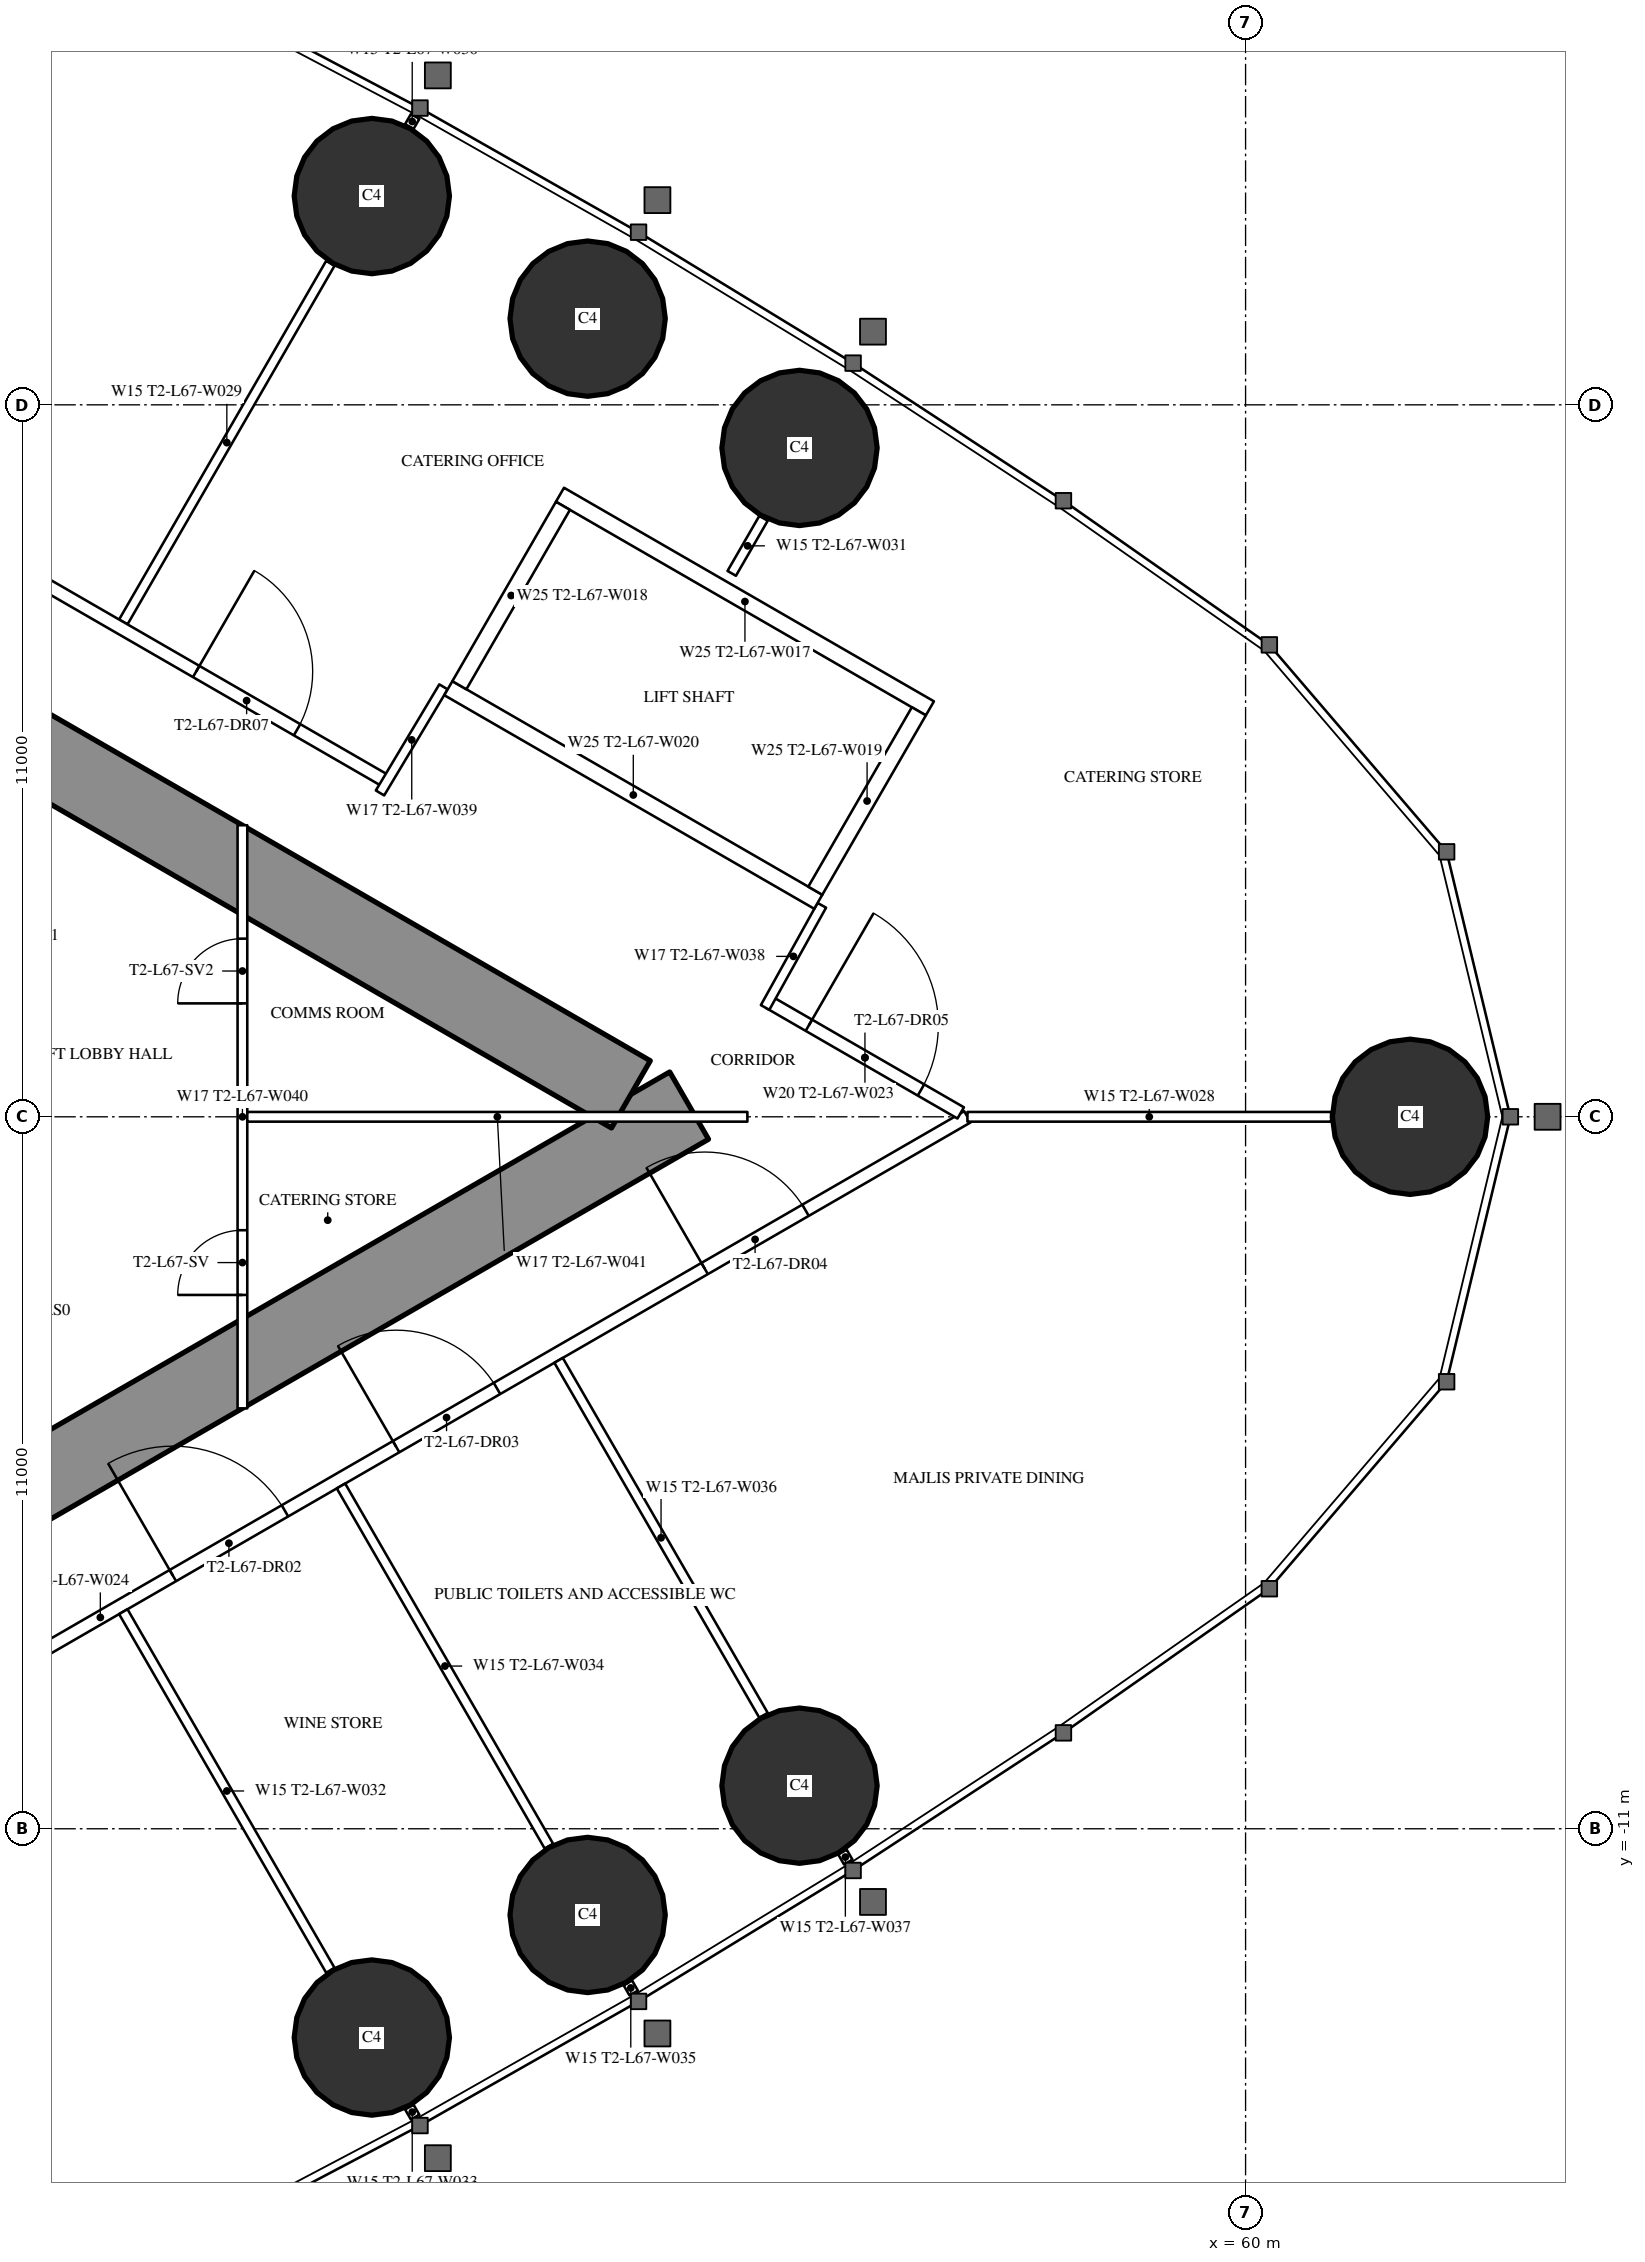
"""IFC4 building model, lengths in metres.
Left out: names, types, materials, properties, quantities, classifications, styles, units other than length and angle.
Written with IfcOpenShell. Run it as: python <this file> out.ifc"""

import sys

from ifc_helpers import new_model, si_unit, direction, frame, frame_2d, origin, origin_2d, place, context, subcontext, project, spatial, rectangle, circle, extrude, element, fill, save


model = new_model("IFC4")
c1 = context("Model", 3, precision=1e-05, world=origin(), true_north=direction((0.0, 1.0)))
c2 = subcontext(c1, "Body", "Model", "MODEL_VIEW")
j1 = project(units=[si_unit("LENGTHUNIT", "METRE"), si_unit("PLANEANGLEUNIT", "RADIAN")], contexts=[c1])
p1 = place(None, origin())
s1 = spatial("IfcSite", under=j1, at=p1, CompositionType="ELEMENT")
p2 = place(p1, origin())
s2 = spatial("IfcBuilding", under=s1, at=p2, CompositionType="ELEMENT")
p3 = place(p2, frame((0.0, 0.0, 251.9)))
s3 = spatial("IfcBuildingStorey", under=s2, at=p3, CompositionType="ELEMENT", Elevation=251.9)
for number, where, z_axis, x_axis in (
    (1, (62.542, 0.0, 0.0), (0.0, 0.0, 1.0), (1.0, 0.0, 0.0)),
    (2, (53.108, 10.334, 0.0), (0.0, 0.0, 1.0), (1.0, 0.0, 0.0)),
    (3, (49.834, 12.332, 0.0), (0.0, 0.0, 1.0), (1.0, 0.0, 0.0)),
    (4, (46.499, 14.226, 0.0), (0.0, 0.0, 1.0), (1.0, 0.0, 0.0)),
    (5, (46.499, -14.226, 0.0), (0.0, 0.0, 1.0), (1.0, 0.0, 0.0)),
    (6, (49.834, -12.332, 0.0), (0.0, 0.0, 1.0), (1.0, 0.0, 0.0)),
    (7, (53.108, -10.334, 0.0), (0.0, 0.0, 1.0), (1.0, 0.0, 0.0)),
):
    element("IfcColumn", number, at=place(p3, frame(where, z_axis=z_axis, x_axis=x_axis)), inside=s3, PredefinedType="COLUMN", context=c2, shape_type="SweptSolid", body=[
        extrude(circle(Radius=1.2, at=origin_2d()), origin(), (0.0, 0.0, 1.0), 5.4),
    ])
p4 = place(p3, frame((27.2, -13.8, 0.0), z_axis=(0.0, 0.0, 1.0), x_axis=(0.866027159892, 0.499996958321, 0.0)))
e8 = element("IfcWall", 8, at=p4, inside=s3, PredefinedType="SHEAR", context=c2, shape_type="SweptSolid", body=[
    extrude(rectangle(XDim=27.947, YDim=1.2, at=frame_2d((13.973, 0.0))), origin(), (0.0, 0.0, 1.0), 5.4),
])
p5 = place(p4, frame((4.6, 0.0, 0.0)))
e9 = element("IfcOpeningElement", 9, at=p5, cuts=e8, PredefinedType="OPENING", context=c2, shape_type="SweptSolid", body=[
    extrude(rectangle(XDim=1.0, YDim=2.2, at=frame_2d((0.5, 1.1))), frame((0.0, 0.61, 0.0), z_axis=(0.0, -1.0, 0.0), x_axis=(1.0, 0.0, 0.0)), (0.0, 0.0, 1.0), 1.22),
])
p6 = place(p4, frame((13.395, 0.0, 0.0)))
e10 = element("IfcOpeningElement", 10, at=p6, cuts=e8, PredefinedType="OPENING", context=c2, shape_type="SweptSolid", body=[
    extrude(rectangle(XDim=1.8, YDim=2.2, at=frame_2d((0.9, 1.1))), frame((0.0, 0.61, 0.0), z_axis=(0.0, -1.0, 0.0), x_axis=(1.0, 0.0, 0.0)), (0.0, 0.0, 1.0), 1.22),
])
p7 = place(p3, frame((27.2, 13.8, 0.0), z_axis=(0.0, 0.0, 1.0), x_axis=(0.866024515034, -0.500001539357, 0.0)))
e11 = element("IfcWall", 11, at=p7, inside=s3, PredefinedType="SHEAR", context=c2, shape_type="SweptSolid", body=[
    extrude(rectangle(XDim=26.907, YDim=1.2, at=frame_2d((13.454, 0.0))), origin(), (0.0, 0.0, 1.0), 5.4),
])
p8 = place(p7, frame((4.6, 0.0, 0.0)))
e12 = element("IfcOpeningElement", 12, at=p8, cuts=e11, PredefinedType="OPENING", context=c2, shape_type="SweptSolid", body=[
    extrude(rectangle(XDim=1.0, YDim=2.2, at=frame_2d((0.5, 1.1))), frame((0.0, 0.61, 0.0), z_axis=(0.0, -1.0, 0.0), x_axis=(1.0, 0.0, 0.0)), (0.0, 0.0, 1.0), 1.22),
])
p9 = place(p7, frame((13.395, 0.0, 0.0)))
e13 = element("IfcOpeningElement", 13, at=p9, cuts=e11, PredefinedType="OPENING", context=c2, shape_type="SweptSolid", body=[
    extrude(rectangle(XDim=1.8, YDim=2.2, at=frame_2d((0.9, 1.1))), frame((0.0, 0.61, 0.0), z_axis=(0.0, -1.0, 0.0), x_axis=(1.0, 0.0, 0.0)), (0.0, 0.0, 1.0), 1.22),
])
p10 = place(p3, frame((28.907, -15.47, 0.0), z_axis=(0.0, 0.0, 1.0), x_axis=(0.866023700353, 0.500002950419, 0.0)))
e14 = element("IfcWall", 14, at=p10, inside=s3, PredefinedType="PARTITIONING", context=c2, shape_type="SweptSolid", body=[
    extrude(rectangle(XDim=30.941, YDim=0.2, at=frame_2d((15.47, 0.0))), origin(), (0.0, 0.0, 1.0), 5.15),
])
p11 = place(p10, frame((7.124, 0.0, 0.0)))
e15 = element("IfcOpeningElement", 15, at=p11, cuts=e14, PredefinedType="OPENING", context=c2, shape_type="SweptSolid", body=[
    extrude(rectangle(XDim=1.8, YDim=2.2, at=frame_2d((0.9, 1.1))), frame((0.0, 0.11, 0.0), z_axis=(0.0, -1.0, 0.0), x_axis=(1.0, 0.0, 0.0)), (0.0, 0.0, 1.0), 0.22),
])
p12 = place(p10, frame((16.765, 0.0, 0.0)))
e16 = element("IfcOpeningElement", 16, at=p12, cuts=e14, PredefinedType="OPENING", context=c2, shape_type="SweptSolid", body=[
    extrude(rectangle(XDim=2.0, YDim=2.4, at=frame_2d((1.0, 1.2))), frame((0.0, 0.11, 0.0), z_axis=(0.0, -1.0, 0.0), x_axis=(1.0, 0.0, 0.0)), (0.0, 0.0, 1.0), 0.22),
])
p13 = place(p10, frame((20.748, 0.0, 0.0)))
e17 = element("IfcOpeningElement", 17, at=p13, cuts=e14, PredefinedType="OPENING", context=c2, shape_type="SweptSolid", body=[
    extrude(rectangle(XDim=1.8, YDim=2.2, at=frame_2d((0.9, 1.1))), frame((0.0, 0.11, 0.0), z_axis=(0.0, -1.0, 0.0), x_axis=(1.0, 0.0, 0.0)), (0.0, 0.0, 1.0), 0.22),
])
p14 = place(p10, frame((26.252, 0.0, 0.0)))
e18 = element("IfcOpeningElement", 18, at=p14, cuts=e14, PredefinedType="OPENING", context=c2, shape_type="SweptSolid", body=[
    extrude(rectangle(XDim=1.8, YDim=2.2, at=frame_2d((0.9, 1.1))), frame((0.0, 0.11, 0.0), z_axis=(0.0, -1.0, 0.0), x_axis=(1.0, 0.0, 0.0)), (0.0, 0.0, 1.0), 0.22),
])
p15 = place(p3, frame((42.66, -7.646, 0.0), z_axis=(0.0, 0.0, 1.0), x_axis=(0.499996592859, -0.866027370889, 0.0)))
e19 = element("IfcWall", 19, at=p15, inside=s3, PredefinedType="PARTITIONING", context=c2, shape_type="SweptSolid", body=[
    extrude(rectangle(XDim=6.398, YDim=0.15, at=frame_2d((3.199, 0.0))), origin(), (0.0, 0.0, 1.0), 4.25),
])
p16 = place(p3, frame((47.079, -15.3, 0.0), z_axis=(0.0, 0.0, 1.0), x_axis=(0.499212083968, -0.866479829667, 0.0)))
e20 = element("IfcWall", 20, at=p16, inside=s3, PredefinedType="PARTITIONING", context=c2, shape_type="SweptSolid", body=[
    extrude(rectangle(XDim=0.179, YDim=0.15, at=frame_2d((0.09, 0.0))), origin(), (0.0, 0.0, 1.0), 4.25),
])
p17 = place(p3, frame((46.023, -5.704, 0.0), z_axis=(0.0, 0.0, 1.0), x_axis=(0.499984478165, -0.866034365135, 0.0)))
e21 = element("IfcWall", 21, at=p17, inside=s3, PredefinedType="PARTITIONING", context=c2, shape_type="SweptSolid", body=[
    extrude(rectangle(XDim=6.426, YDim=0.15, at=frame_2d((3.213, 0.0))), origin(), (0.0, 0.0, 1.0), 4.25),
])
p18 = place(p3, frame((50.456, -13.382, 0.0), z_axis=(0.0, 0.0, 1.0), x_axis=(0.500661834965, -0.865642955848, 0.0)))
e22 = element("IfcWall", 22, at=p18, inside=s3, PredefinedType="PARTITIONING", context=c2, shape_type="SweptSolid", body=[
    extrude(rectangle(XDim=0.18, YDim=0.15, at=frame_2d((0.09, 0.0))), origin(), (0.0, 0.0, 1.0), 4.25),
])
p19 = place(p3, frame((49.385, -3.763, 0.0), z_axis=(0.0, 0.0, 1.0), x_axis=(0.499999447814, -0.866025722589, 0.0)))
e23 = element("IfcWall", 23, at=p19, inside=s3, PredefinedType="PARTITIONING", context=c2, shape_type="SweptSolid", body=[
    extrude(rectangle(XDim=6.333, YDim=0.15, at=frame_2d((3.166, 0.0))), origin(), (0.0, 0.0, 1.0), 4.25),
])
p20 = place(p3, frame((53.771, -11.36, 0.0), z_axis=(0.0, 0.0, 1.0), x_axis=(0.499524978789, -0.866299483762, 0.0)))
e24 = element("IfcWall", 24, at=p20, inside=s3, PredefinedType="PARTITIONING", context=c2, shape_type="SweptSolid", body=[
    extrude(rectangle(XDim=0.178, YDim=0.15, at=frame_2d((0.089, 0.0))), origin(), (0.0, 0.0, 1.0), 4.25),
])
p21 = place(p3, frame((42.66, 7.646, 0.0), z_axis=(0.0, 0.0, 1.0), x_axis=(0.499996592859, 0.866027370889, 0.0)))
e25 = element("IfcWall", 25, at=p21, inside=s3, PredefinedType="PARTITIONING", context=c2, shape_type="SweptSolid", body=[
    extrude(rectangle(XDim=6.398, YDim=0.15, at=frame_2d((3.199, 0.0))), origin(), (0.0, 0.0, 1.0), 4.25),
])
p22 = place(p3, frame((47.079, 15.3, 0.0), z_axis=(0.0, 0.0, 1.0), x_axis=(0.499212083968, 0.866479829667, 0.0)))
e26 = element("IfcWall", 26, at=p22, inside=s3, PredefinedType="PARTITIONING", context=c2, shape_type="SweptSolid", body=[
    extrude(rectangle(XDim=0.179, YDim=0.15, at=frame_2d((0.09, 0.0))), origin(), (0.0, 0.0, 1.0), 4.25),
])
p23 = place(p3, frame((55.702, 0.0, 0.0), z_axis=(0.0, 0.0, 1.0), x_axis=(1.0, 0.0, 0.0)))
e27 = element("IfcWall", 27, at=p23, inside=s3, PredefinedType="PARTITIONING", context=c2, shape_type="SweptSolid", body=[
    extrude(rectangle(XDim=5.619, YDim=0.15, at=frame_2d((2.81, 0.0))), origin(), (0.0, 0.0, 1.0), 4.25),
])
p24 = place(p3, frame((52.06, 8.396, 0.0), z_axis=(0.0, 0.0, 1.0), x_axis=(0.500095379624, 0.865970329329, 0.0)))
e28 = element("IfcWall", 28, at=p24, inside=s3, PredefinedType="PARTITIONING", context=c2, shape_type="SweptSolid", body=[
    extrude(rectangle(XDim=0.982, YDim=0.15, at=frame_2d((0.491, 0.0))), origin(), (0.0, 0.0, 1.0), 5.15),
])
p25 = place(p3, frame((28.907, 15.47, 0.0), z_axis=(0.0, 0.0, 1.0), x_axis=(0.866026627509, -0.499997880441, 0.0)))
e29 = element("IfcWall", 29, at=p25, inside=s3, PredefinedType="PARTITIONING", context=c2, shape_type="SweptSolid", body=[
    extrude(rectangle(XDim=20.563, YDim=0.2, at=frame_2d((10.282, 0.0))), origin(), (0.0, 0.0, 1.0), 5.15),
])
p26 = place(p25, frame((17.181, 0.0, 0.0)))
e30 = element("IfcOpeningElement", 30, at=p26, cuts=e29, PredefinedType="OPENING", context=c2, shape_type="SweptSolid", body=[
    extrude(rectangle(XDim=1.8, YDim=2.2, at=frame_2d((0.9, 1.1))), frame((0.0, 0.11, 0.0), z_axis=(0.0, -1.0, 0.0), x_axis=(1.0, 0.0, 0.0)), (0.0, 0.0, 1.0), 0.22),
])
p27 = place(p25, frame((7.024, 0.0, 0.0)))
e31 = element("IfcOpeningElement", 31, at=p27, cuts=e29, PredefinedType="OPENING", context=c2, shape_type="SweptSolid", body=[
    extrude(rectangle(XDim=2.0, YDim=2.4, at=frame_2d((1.0, 1.2))), frame((0.0, 0.11, 0.0), z_axis=(0.0, -1.0, 0.0), x_axis=(1.0, 0.0, 0.0)), (0.0, 0.0, 1.0), 0.22),
])
p28 = place(p3, frame((52.639, 1.769, 0.0), z_axis=(0.0, 0.0, 1.0), x_axis=(0.866027340901, -0.4999966448, 0.0)))
e32 = element("IfcWall", 32, at=p28, inside=s3, PredefinedType="PARTITIONING", context=c2, shape_type="SweptSolid", body=[
    extrude(rectangle(XDim=3.417, YDim=0.2, at=frame_2d((1.708, 0.0))), origin(), (0.0, 0.0, 1.0), 5.15),
])
p29 = place(p28, frame((0.708, 0.0, 0.0)))
e33 = element("IfcOpeningElement", 33, at=p29, cuts=e32, PredefinedType="OPENING", context=c2, shape_type="SweptSolid", body=[
    extrude(rectangle(XDim=2.0, YDim=2.4, at=frame_2d((1.0, 1.2))), frame((0.0, 0.11, 0.0), z_axis=(0.0, -1.0, 0.0), x_axis=(1.0, 0.0, 0.0)), (0.0, 0.0, 1.0), 0.22),
])
p30 = place(p3, frame((47.606, 6.642, 0.0), z_axis=(0.0, 0.0, 1.0), x_axis=(-0.51353662755, -0.858067673418, 0.0)))
e34 = element("IfcWall", 34, at=p30, inside=s3, PredefinedType="PARTITIONING", context=c2, shape_type="SweptSolid", body=[
    extrude(rectangle(XDim=1.91, YDim=0.15, at=frame_2d((0.955, 0.0))), origin(), (0.0, 0.0, 1.0), 5.15),
])
p31 = place(p3, frame((52.576, 1.689, 0.0), z_axis=(0.0, 0.0, 1.0), x_axis=(0.485482130951, 0.874246590229, 0.0)))
e35 = element("IfcWall", 35, at=p31, inside=s3, PredefinedType="PARTITIONING", context=c2, shape_type="SweptSolid", body=[
    extrude(rectangle(XDim=1.805, YDim=0.15, at=frame_2d((0.902, 0.0))), origin(), (0.0, 0.0, 1.0), 5.15),
])
p32 = place(p3, frame((44.5, -4.505, 0.0), z_axis=(0.0, 0.0, 1.0), x_axis=(0.0, 1.0, 0.0)))
e36 = element("IfcWall", 36, at=p32, inside=s3, PredefinedType="PARTITIONING", context=c2, shape_type="SweptSolid", body=[
    extrude(rectangle(XDim=9.009, YDim=0.15, at=frame_2d((4.505, 0.0))), origin(), (0.0, 0.0, 1.0), 5.15),
])
p33 = place(p32, frame((1.752, 0.0, 0.0)))
e37 = element("IfcOpeningElement", 37, at=p33, cuts=e36, PredefinedType="OPENING", context=c2, shape_type="SweptSolid", body=[
    extrude(rectangle(XDim=1.0, YDim=2.2, at=frame_2d((0.5, 1.1))), frame((0.0, 0.085, 0.0), z_axis=(0.0, -1.0, 0.0), x_axis=(1.0, 0.0, 0.0)), (0.0, 0.0, 1.0), 0.17),
])
p34 = place(p32, frame((6.257, 0.0, 0.0)))
e38 = element("IfcOpeningElement", 38, at=p34, cuts=e36, PredefinedType="OPENING", context=c2, shape_type="SweptSolid", body=[
    extrude(rectangle(XDim=1.0, YDim=2.2, at=frame_2d((0.5, 1.1))), frame((0.0, 0.085, 0.0), z_axis=(0.0, -1.0, 0.0), x_axis=(1.0, 0.0, 0.0)), (0.0, 0.0, 1.0), 0.17),
])
p35 = place(p3, frame((44.575, 0.0, 0.0), z_axis=(0.0, 0.0, 1.0), x_axis=(1.0, 0.0, 0.0)))
e39 = element("IfcWall", 39, at=p35, inside=s3, PredefinedType="PARTITIONING", context=c2, shape_type="SweptSolid", body=[
    extrude(rectangle(XDim=7.727, YDim=0.15, at=frame_2d((3.864, 0.0))), origin(), (0.0, 0.0, 1.0), 4.25),
])
for number, where, z_axis, x_axis in (
    (40, (47.681, 6.622, 0.0), (0.0, 0.0, 1.0), (0.866, -0.5, 0.0)),
    (41, (49.406, 9.611, 0.0), (0.0, 0.0, 1.0), (0.866, -0.5, 0.0)),
):
    element("IfcWall", number, at=place(p3, frame(where, z_axis=z_axis, x_axis=x_axis)), inside=s3, PredefinedType="PARTITIONING", context=c2, shape_type="SweptSolid", body=[
        extrude(rectangle(XDim=6.6, YDim=0.25, at=frame_2d((3.3, 0.0))), origin(), (0.0, 0.0, 1.0), 5.15),
    ])
p36 = place(p3, frame((47.852, 6.668, 0.0), z_axis=(0.0, 0.0, 1.0), x_axis=(0.499929347863, 0.866066190972, 0.0)))
e42 = element("IfcWall", 42, at=p36, inside=s3, PredefinedType="PARTITIONING", context=c2, shape_type="SweptSolid", body=[
    extrude(rectangle(XDim=3.201, YDim=0.25, at=frame_2d((1.6, 0.0))), origin(), (0.0, 0.0, 1.0), 5.15),
])
p37 = place(p3, frame((53.352, 3.493, 0.0), z_axis=(0.0, 0.0, 1.0), x_axis=(0.499872130319, 0.866099216793, 0.0)))
e43 = element("IfcWall", 43, at=p37, inside=s3, PredefinedType="PARTITIONING", context=c2, shape_type="SweptSolid", body=[
    extrude(rectangle(XDim=3.2, YDim=0.25, at=frame_2d((1.6, 0.0))), origin(), (0.0, 0.0, 1.0), 5.15),
])
p38 = place(p12, origin())
e44 = element("IfcDoor", 44, at=p38, inside=s3, OperationType="DOUBLE_DOOR_SINGLE_SWING", PredefinedType="DOOR", context=c2, shape_type="SweptSolid", body=[
    extrude(rectangle(XDim=2.0, YDim=2.4, at=frame_2d((1.0, 1.2))), frame((0.0, 0.025, 0.0), z_axis=(0.0, -1.0, 0.0), x_axis=(1.0, 0.0, 0.0)), (0.0, 0.0, 1.0), 0.05),
])
fill(e16, e44)
p39 = place(p13, origin())
e45 = element("IfcDoor", 45, at=p39, inside=s3, OperationType="DOUBLE_DOOR_SINGLE_SWING", PredefinedType="DOOR", context=c2, shape_type="SweptSolid", body=[
    extrude(rectangle(XDim=1.8, YDim=2.2, at=frame_2d((0.9, 1.1))), frame((0.0, 0.025, 0.0), z_axis=(0.0, -1.0, 0.0), x_axis=(1.0, 0.0, 0.0)), (0.0, 0.0, 1.0), 0.05),
])
fill(e17, e45)
p40 = place(p14, origin())
e46 = element("IfcDoor", 46, at=p40, inside=s3, OperationType="DOUBLE_DOOR_SINGLE_SWING", PredefinedType="DOOR", context=c2, shape_type="SweptSolid", body=[
    extrude(rectangle(XDim=1.8, YDim=2.2, at=frame_2d((0.9, 1.1))), frame((0.0, 0.025, 0.0), z_axis=(0.0, -1.0, 0.0), x_axis=(1.0, 0.0, 0.0)), (0.0, 0.0, 1.0), 0.05),
])
fill(e18, e46)
p41 = place(p26, origin())
e47 = element("IfcDoor", 47, at=p41, inside=s3, OperationType="DOUBLE_DOOR_SINGLE_SWING", PredefinedType="DOOR", context=c2, shape_type="SweptSolid", body=[
    extrude(rectangle(XDim=1.8, YDim=2.2, at=frame_2d((0.9, 1.1))), frame((0.0, 0.025, 0.0), z_axis=(0.0, -1.0, 0.0), x_axis=(1.0, 0.0, 0.0)), (0.0, 0.0, 1.0), 0.05),
])
fill(e30, e47)
p42 = place(p29, origin())
e48 = element("IfcDoor", 48, at=p42, inside=s3, OperationType="DOUBLE_DOOR_SINGLE_SWING", PredefinedType="DOOR", context=c2, shape_type="SweptSolid", body=[
    extrude(rectangle(XDim=2.0, YDim=2.4, at=frame_2d((1.0, 1.2))), frame((0.0, 0.025, 0.0), z_axis=(0.0, -1.0, 0.0), x_axis=(1.0, 0.0, 0.0)), (0.0, 0.0, 1.0), 0.05),
])
fill(e33, e48)
p43 = place(p33, origin())
e49 = element("IfcDoor", 49, at=p43, inside=s3, OperationType="SINGLE_SWING_LEFT", PredefinedType="DOOR", context=c2, shape_type="SweptSolid", body=[
    extrude(rectangle(XDim=1.0, YDim=2.2, at=frame_2d((0.5, 1.1))), frame((0.0, 0.025, 0.0), z_axis=(0.0, -1.0, 0.0), x_axis=(1.0, 0.0, 0.0)), (0.0, 0.0, 1.0), 0.05),
])
fill(e37, e49)
p44 = place(p34, origin())
e50 = element("IfcDoor", 50, at=p44, inside=s3, OperationType="SINGLE_SWING_LEFT", PredefinedType="DOOR", context=c2, shape_type="SweptSolid", body=[
    extrude(rectangle(XDim=1.0, YDim=2.2, at=frame_2d((0.5, 1.1))), frame((0.0, 0.025, 0.0), z_axis=(0.0, -1.0, 0.0), x_axis=(1.0, 0.0, 0.0)), (0.0, 0.0, 1.0), 0.05),
])
fill(e38, e50)
save(model, sys.argv[1])
